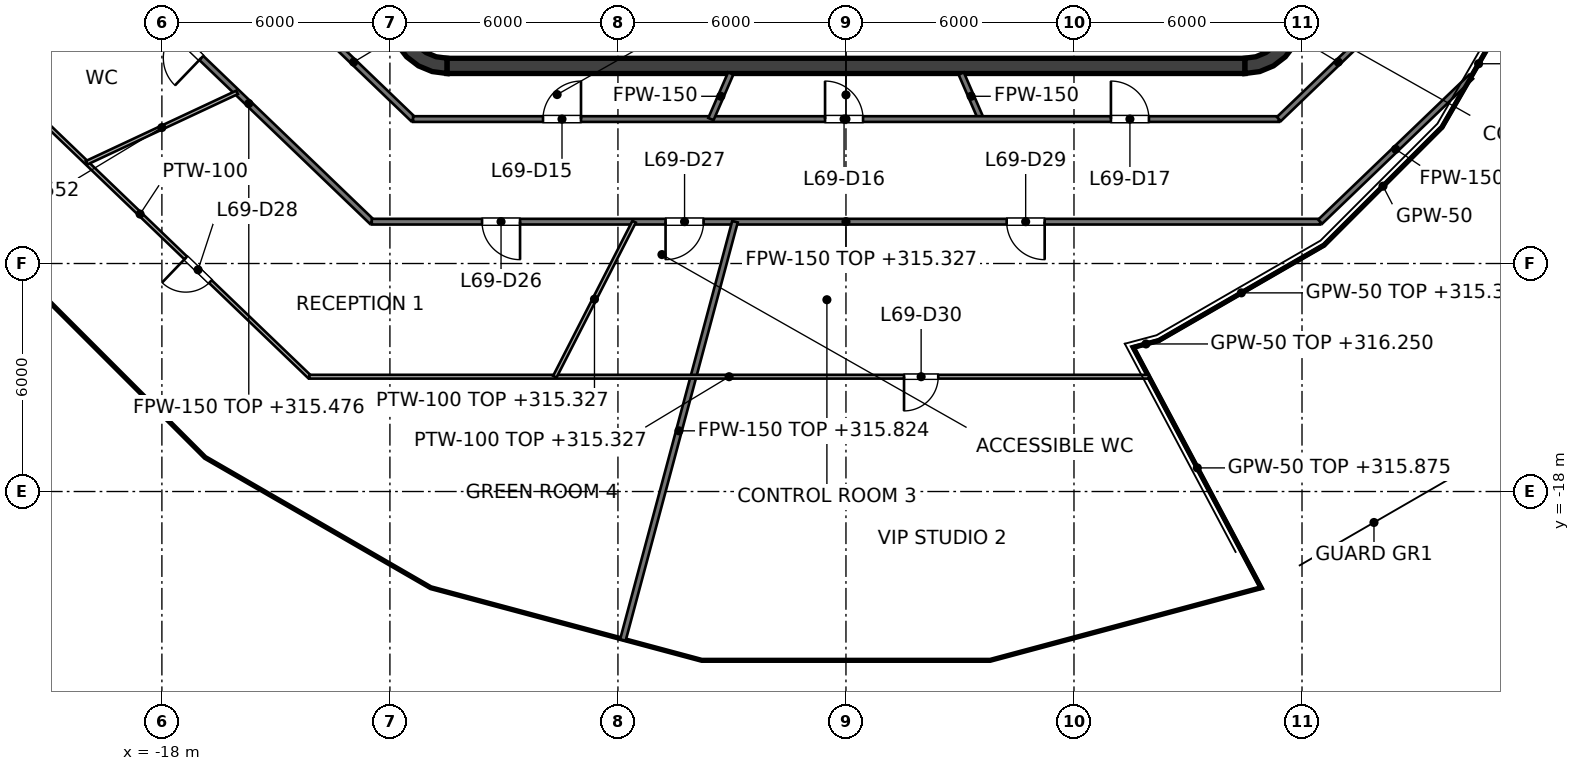
"""IFC4 building model, lengths in metres.
Left out: names, types, materials, properties, quantities, classifications, styles, units other than length and angle.
Written with IfcOpenShell. Run it as: python <this file> out.ifc"""

import sys

from ifc_helpers import new_model, si_unit, direction, frame, frame_2d, origin, place, context, subcontext, project, spatial, polyline, rectangle, outline, extrude, element, fill, save


model = new_model("IFC4")
c1 = context("Model", 3, precision=1e-05, world=origin(), true_north=direction((0.0, 1.0)))
c2 = subcontext(c1, "Body", "Model", "MODEL_VIEW")
j1 = project(units=[si_unit("LENGTHUNIT", "METRE"), si_unit("PLANEANGLEUNIT", "RADIAN")], contexts=[c1])
p1 = place(None, origin())
s1 = spatial("IfcSite", under=j1, at=p1, CompositionType="ELEMENT")
p2 = place(p1, origin())
s2 = spatial("IfcBuilding", under=s1, at=p2, CompositionType="ELEMENT")
p3 = place(p2, frame((0.0, 0.0, 312.4)))
s3 = spatial("IfcBuildingStorey", under=s2, at=p3, CompositionType="ELEMENT", Elevation=312.4)
p4 = place(p3, frame((-10.5, -6.8, 0.0), z_axis=(0.0, 0.0, 1.0), x_axis=(1.0, 0.0, 0.0)))
e1 = element("IfcWall", 1, at=p4, inside=s3, PredefinedType="SHEAR", context=c2, shape_type="SweptSolid", body=[
    extrude(rectangle(XDim=21.0, YDim=0.4, at=frame_2d((10.5, 0.0))), origin(), (0.0, 0.0, 1.0), 4.0),
])
p5 = place(p3, origin())
e2 = element("IfcWall", 2, at=p5, inside=s3, PredefinedType="SHEAR", context=c2, shape_type="SweptSolid", body=[
    extrude(outline(polyline([(-10.5, -7.0), (-10.5, -6.596), (-10.784, -6.559), (-11.048, -6.45), (-11.275, -6.275), (-11.45, -6.048), (-11.559, -5.784), (-11.596, -5.5), (-12.0, -5.5), (-11.949, -5.888), (-11.799, -6.25), (-11.561, -6.561), (-11.25, -6.799), (-10.888, -6.949), (-10.5, -7.0)])), origin(), (0.0, 0.0, 1.0), 4.0),
])
e3 = element("IfcWall", 3, at=p5, inside=s3, PredefinedType="SHEAR", context=c2, shape_type="SweptSolid", body=[
    extrude(outline(polyline([(12.0, -5.5), (11.596, -5.5), (11.559, -5.784), (11.45, -6.048), (11.275, -6.275), (11.048, -6.45), (10.784, -6.559), (10.5, -6.596), (10.5, -7.0), (10.888, -6.949), (11.25, -6.799), (11.561, -6.561), (11.799, -6.25), (11.949, -5.888), (12.0, -5.5)])), origin(), (0.0, 0.0, 1.0), 4.0),
])
p6 = place(p3, frame((1.5, -6.6, 0.0), z_axis=(0.0, 0.0, 1.0), x_axis=(0.0, 1.0, 0.0)))
e4 = element("IfcWall", 4, at=p6, inside=s3, PredefinedType="PARTITIONING", context=c2, shape_type="SweptSolid", body=[
    extrude(rectangle(XDim=2.5, YDim=0.15, at=frame_2d((1.25, 0.0))), origin(), (0.0, 0.0, 1.0), 3.85),
])
p7 = place(p6, frame((0.8, 0.0, 0.0)))
e5 = element("IfcOpeningElement", 5, at=p7, cuts=e4, PredefinedType="OPENING", context=c2, shape_type="SweptSolid", body=[
    extrude(rectangle(XDim=0.9, YDim=2.1, at=frame_2d((0.45, 1.05))), frame((0.0, 0.075, 0.0), z_axis=(0.0, -1.0, 0.0), x_axis=(1.0, 0.0, 0.0)), (0.0, 0.0, 1.0), 0.15),
])
p8 = place(p3, frame((9.0, -6.6, 0.0), z_axis=(0.0, 0.0, 1.0), x_axis=(0.0, 1.0, 0.0)))
e6 = element("IfcWall", 6, at=p8, inside=s3, PredefinedType="SOLIDWALL", context=c2, shape_type="SweptSolid", body=[
    extrude(rectangle(XDim=2.5, YDim=0.25, at=frame_2d((1.25, 0.0))), origin(), (0.0, 0.0, 1.0), 3.85),
])
p9 = place(p8, frame((0.65, 0.0, 0.0)))
e7 = element("IfcOpeningElement", 7, at=p9, cuts=e6, PredefinedType="OPENING", context=c2, shape_type="SweptSolid", body=[
    extrude(rectangle(XDim=1.2, YDim=2.1, at=frame_2d((0.6, 1.05))), frame((0.0, 0.125, 0.0), z_axis=(0.0, -1.0, 0.0), x_axis=(1.0, 0.0, 0.0)), (0.0, 0.0, 1.0), 0.25),
])
p10 = place(p3, frame((-9.0, -6.6, 0.0), z_axis=(0.0, 0.0, 1.0), x_axis=(0.0, 1.0, 0.0)))
e8 = element("IfcWall", 8, at=p10, inside=s3, PredefinedType="PARTITIONING", context=c2, shape_type="SweptSolid", body=[
    extrude(rectangle(XDim=2.5, YDim=0.25, at=frame_2d((1.25, 0.0))), origin(), (0.0, 0.0, 1.0), 3.85),
])
p11 = place(p10, frame((0.75, 0.0, 0.0)))
e9 = element("IfcOpeningElement", 9, at=p11, cuts=e8, PredefinedType="OPENING", context=c2, shape_type="SweptSolid", body=[
    extrude(rectangle(XDim=1.0, YDim=2.1, at=frame_2d((0.5, 1.05))), frame((0.0, 0.125, 0.0), z_axis=(0.0, -1.0, 0.0), x_axis=(1.0, 0.0, 0.0)), (0.0, 0.0, 1.0), 0.25),
])
p12 = place(p3, frame((3.15, -6.6, 0.0), z_axis=(0.0, 0.0, 1.0), x_axis=(0.0, 1.0, 0.0)))
e10 = element("IfcWall", 10, at=p12, inside=s3, PredefinedType="SOLIDWALL", context=c2, shape_type="SweptSolid", body=[
    extrude(rectangle(XDim=2.5, YDim=0.25, at=frame_2d((1.25, 0.0))), origin(), (0.0, 0.0, 1.0), 3.85),
])
p13 = place(p3, frame((-2.9, -6.6, 0.0), z_axis=(0.0, 0.0, 1.0), x_axis=(0.0, 1.0, 0.0)))
e11 = element("IfcWall", 11, at=p13, inside=s3, PredefinedType="PARTITIONING", context=c2, shape_type="SweptSolid", body=[
    extrude(rectangle(XDim=2.5, YDim=0.25, at=frame_2d((1.25, 0.0))), origin(), (0.0, 0.0, 1.0), 3.85),
])
p14 = place(p13, frame((0.8, 0.0, 0.0)))
e12 = element("IfcOpeningElement", 12, at=p14, cuts=e11, PredefinedType="OPENING", context=c2, shape_type="SweptSolid", body=[
    extrude(rectangle(XDim=0.9, YDim=2.1, at=frame_2d((0.45, 1.05))), frame((0.0, 0.125, 0.0), z_axis=(0.0, -1.0, 0.0), x_axis=(1.0, 0.0, 0.0)), (0.0, 0.0, 1.0), 0.25),
])
p15 = place(p3, frame((3.033, -7.0, 0.0), z_axis=(0.0, 0.0, 1.0), x_axis=(0.397906243356, -0.917426085033, 0.0)))
e13 = element("IfcWall", 13, at=p15, inside=s3, PredefinedType="PARTITIONING", context=c2, shape_type="SweptSolid", body=[
    extrude(rectangle(XDim=1.307, YDim=0.15, at=frame_2d((0.653, 0.0))), origin(), (0.0, 0.0, 1.0), 3.85),
])
p16 = place(p3, frame((-18.95, -4.683, 0.0), z_axis=(0.0, 0.0, 1.0), x_axis=(0.721312831662, -0.692609412931, 0.0)))
e14 = element("IfcWall", 14, at=p16, inside=s3, PredefinedType="PARTITIONING", context=c2, shape_type="SweptSolid", body=[
    extrude(rectangle(XDim=8.973, YDim=0.15, at=frame_2d((4.487, 0.0))), origin(), (0.0, 0.0, 1.0), 3.076),
])
p17 = place(p16, frame((1.755, 0.0, 0.0)))
e15 = element("IfcOpeningElement", 15, at=p17, cuts=e14, PredefinedType="OPENING", context=c2, shape_type="SweptSolid", body=[
    extrude(rectangle(XDim=1.0, YDim=2.1, at=frame_2d((0.5, 1.05))), frame((0.0, 0.075, 0.0), z_axis=(0.0, -1.0, 0.0), x_axis=(1.0, 0.0, 0.0)), (0.0, 0.0, 1.0), 0.15),
])
p18 = place(p3, frame((-14.514, -5.2, 0.0), z_axis=(0.0, 0.0, 1.0), x_axis=(0.721283649967, -0.692639802704, 0.0)))
e16 = element("IfcWall", 16, at=p18, inside=s3, PredefinedType="PARTITIONING", context=c2, shape_type="SweptSolid", body=[
    extrude(rectangle(XDim=4.33, YDim=0.15, at=frame_2d((2.165, 0.0))), origin(), (0.0, 0.0, 1.0), 3.152),
])
p19 = place(p3, frame((-12.478, -10.899, 0.0), z_axis=(0.0, 0.0, 1.0), x_axis=(1.0, 0.0, 0.0)))
e17 = element("IfcWall", 17, at=p19, inside=s3, PredefinedType="PARTITIONING", context=c2, shape_type="SweptSolid", body=[
    extrude(rectangle(XDim=24.956, YDim=0.15, at=frame_2d((12.478, 0.0))), origin(), (0.0, 0.0, 1.0), 2.927),
])
p20 = place(p19, frame((2.902, 0.0, 0.0)))
e18 = element("IfcOpeningElement", 18, at=p20, cuts=e17, PredefinedType="OPENING", context=c2, shape_type="SweptSolid", body=[
    extrude(rectangle(XDim=1.0, YDim=2.1, at=frame_2d((0.5, 1.05))), frame((0.0, 0.075, 0.0), z_axis=(0.0, -1.0, 0.0), x_axis=(1.0, 0.0, 0.0)), (0.0, 0.0, 1.0), 0.15),
])
p21 = place(p19, frame((7.731, 0.0, 0.0)))
e19 = element("IfcOpeningElement", 19, at=p21, cuts=e17, PredefinedType="OPENING", context=c2, shape_type="SweptSolid", body=[
    extrude(rectangle(XDim=1.0, YDim=2.1, at=frame_2d((0.5, 1.05))), frame((0.0, 0.075, 0.0), z_axis=(0.0, -1.0, 0.0), x_axis=(1.0, 0.0, 0.0)), (0.0, 0.0, 1.0), 0.15),
])
p22 = place(p19, frame((16.707, 0.0, 0.0)))
e20 = element("IfcOpeningElement", 20, at=p22, cuts=e17, PredefinedType="OPENING", context=c2, shape_type="SweptSolid", body=[
    extrude(rectangle(XDim=1.0, YDim=2.1, at=frame_2d((0.5, 1.05))), frame((0.0, 0.075, 0.0), z_axis=(0.0, -1.0, 0.0), x_axis=(1.0, 0.0, 0.0)), (0.0, 0.0, 1.0), 0.15),
])
p23 = place(p3, frame((-11.391, -8.199, 0.0), z_axis=(0.0, 0.0, 1.0), x_axis=(1.0, 0.0, 0.0)))
e21 = element("IfcWall", 21, at=p23, inside=s3, PredefinedType="PARTITIONING", context=c2, shape_type="SweptSolid", body=[
    extrude(rectangle(XDim=22.782, YDim=0.15, at=frame_2d((11.391, 0.0))), origin(), (0.0, 0.0, 1.0), 2.927),
])
p24 = place(p23, frame((3.419, 0.0, 0.0)))
e22 = element("IfcOpeningElement", 22, at=p24, cuts=e21, PredefinedType="OPENING", context=c2, shape_type="SweptSolid", body=[
    extrude(rectangle(XDim=1.0, YDim=2.1, at=frame_2d((0.5, 1.05))), frame((0.0, 0.075, 0.0), z_axis=(0.0, -1.0, 0.0), x_axis=(1.0, 0.0, 0.0)), (0.0, 0.0, 1.0), 0.15),
])
p25 = place(p23, frame((10.841, 0.0, 0.0)))
e23 = element("IfcOpeningElement", 23, at=p25, cuts=e21, PredefinedType="OPENING", context=c2, shape_type="SweptSolid", body=[
    extrude(rectangle(XDim=1.0, YDim=2.1, at=frame_2d((0.5, 1.05))), frame((0.0, 0.075, 0.0), z_axis=(0.0, -1.0, 0.0), x_axis=(1.0, 0.0, 0.0)), (0.0, 0.0, 1.0), 0.15),
])
p26 = place(p23, frame((18.363, 0.0, 0.0)))
e24 = element("IfcOpeningElement", 24, at=p26, cuts=e21, PredefinedType="OPENING", context=c2, shape_type="SweptSolid", body=[
    extrude(rectangle(XDim=1.0, YDim=2.1, at=frame_2d((0.5, 1.05))), frame((0.0, 0.075, 0.0), z_axis=(0.0, -1.0, 0.0), x_axis=(1.0, 0.0, 0.0)), (0.0, 0.0, 1.0), 0.15),
])
p27 = place(p3, frame((-24.461, -6.554, 0.0), z_axis=(0.0, 0.0, 1.0), x_axis=(0.965890459785, 0.258950998638, 0.0)))
e25 = element("IfcWall", 25, at=p27, inside=s3, PredefinedType="PARTITIONING", context=c2, shape_type="SweptSolid", body=[
    extrude(rectangle(XDim=6.038, YDim=0.15, at=frame_2d((3.019, 0.0))), origin(), (0.0, 0.0, 1.0), 3.527),
])
p28 = place(p3, frame((12.478, -10.899, 0.0), z_axis=(0.0, 0.0, 1.0), x_axis=(0.721258856926, 0.692665620127, 0.0)))
e26 = element("IfcWall", 26, at=p28, inside=s3, PredefinedType="PARTITIONING", context=c2, shape_type="SweptSolid", body=[
    extrude(rectangle(XDim=5.507, YDim=0.15, at=frame_2d((2.754, 0.0))), origin(), (0.0, 0.0, 1.0), 3.076),
])
p29 = place(p3, frame((11.391, -8.199, 0.0), z_axis=(0.0, 0.0, 1.0), x_axis=(0.721256597366, 0.692667972954, 0.0)))
e27 = element("IfcWall", 27, at=p29, inside=s3, PredefinedType="PARTITIONING", context=c2, shape_type="SweptSolid", body=[
    extrude(rectangle(XDim=4.33, YDim=0.15, at=frame_2d((2.165, 0.0))), origin(), (0.0, 0.0, 1.0), 3.152),
])
p30 = place(p3, frame((-3.553, -8.199, 0.0), z_axis=(0.0, 0.0, 1.0), x_axis=(0.397906243356, 0.917426085033, 0.0)))
e28 = element("IfcWall", 28, at=p30, inside=s3, PredefinedType="PARTITIONING", context=c2, shape_type="SweptSolid", body=[
    extrude(rectangle(XDim=1.307, YDim=0.15, at=frame_2d((0.653, 0.0))), origin(), (0.0, 0.0, 1.0), 3.85),
])
p31 = place(p3, frame((-5.87, -21.907, 0.0), z_axis=(0.0, 0.0, 1.0), x_axis=(0.258847804171, 0.965918119861, 0.0)))
e29 = element("IfcWall", 29, at=p31, inside=s3, PredefinedType="PARTITIONING", context=c2, shape_type="SweptSolid", body=[
    extrude(rectangle(XDim=11.396, YDim=0.15, at=frame_2d((5.698, 0.0))), origin(), (0.0, 0.0, 1.0), 3.424),
])
p32 = place(p3, frame((7.558, -14.207, 0.0), z_axis=(0.0, 0.0, 1.0), x_axis=(0.46979441649, -0.882775852771, 0.0)))
e30 = element("IfcWall", 30, at=p32, inside=s3, PredefinedType="PARTITIONING", context=c2, shape_type="SweptSolid", body=[
    extrude(rectangle(XDim=7.185, YDim=0.05, at=frame_2d((3.593, 0.0))), origin(), (0.0, 0.0, 1.0), 3.475),
])
p33 = place(p3, frame((7.558, -14.207, 0.0), z_axis=(0.0, 0.0, 1.0), x_axis=(0.966054348396, 0.258338916824, 0.0)))
e31 = element("IfcWall", 31, at=p33, inside=s3, PredefinedType="PARTITIONING", context=c2, shape_type="SweptSolid", body=[
    extrude(rectangle(XDim=0.697, YDim=0.05, at=frame_2d((0.348, 0.0))), origin(), (0.0, 0.0, 1.0), 3.85),
])
p34 = place(p3, frame((8.231, -14.027, 0.0), z_axis=(0.0, 0.0, 1.0), x_axis=(0.866082721662, 0.49990070938, 0.0)))
e32 = element("IfcWall", 32, at=p34, inside=s3, PredefinedType="PARTITIONING", context=c2, shape_type="SweptSolid", body=[
    extrude(rectangle(XDim=5.019, YDim=0.05, at=frame_2d((2.51, 0.0))), origin(), (0.0, 0.0, 1.0), 2.927),
])
p35 = place(p3, frame((12.578, -11.518, 0.0), z_axis=(0.0, 0.0, 1.0), x_axis=(0.707023420529, 0.707190132017, 0.0)))
e33 = element("IfcWall", 33, at=p35, inside=s3, PredefinedType="PARTITIONING", context=c2, shape_type="SweptSolid", body=[
    extrude(rectangle(XDim=4.393, YDim=0.05, at=frame_2d((2.197, 0.0))), origin(), (0.0, 0.0, 1.0), 3.076),
])
p36 = place(p3, frame((15.684, -8.411, 0.0), z_axis=(0.0, 0.0, 1.0), x_axis=(0.49995654735, 0.86605048973, 0.0)))
e34 = element("IfcWall", 34, at=p36, inside=s3, PredefinedType="PARTITIONING", context=c2, shape_type="SweptSolid", body=[
    extrude(rectangle(XDim=3.852, YDim=0.05, at=frame_2d((1.926, 0.0))), origin(), (0.0, 0.0, 1.0), 3.076),
])
p37 = place(p3, frame((-23.03, -6.421, 0.0), z_axis=(0.0, 0.0, 1.0), x_axis=(0.721337166522, -0.692584068684, 0.0)))
e35 = element("IfcWall", 35, at=p37, inside=s3, PredefinedType="PARTITIONING", context=c2, shape_type="SweptSolid", body=[
    extrude(rectangle(XDim=12.354, YDim=0.1, at=frame_2d((6.177, 0.0))), origin(), (0.0, 0.0, 1.0), 2.995),
])
p38 = place(p37, frame((7.843, 0.0, 0.0)))
e36 = element("IfcOpeningElement", 36, at=p38, cuts=e35, PredefinedType="OPENING", context=c2, shape_type="SweptSolid", body=[
    extrude(rectangle(XDim=0.9, YDim=2.1, at=frame_2d((0.45, 1.05))), frame((0.0, 0.05, 0.0), z_axis=(0.0, -1.0, 0.0), x_axis=(1.0, 0.0, 0.0)), (0.0, 0.0, 1.0), 0.1),
])
p39 = place(p3, frame((-14.12, -14.979, 0.0), z_axis=(0.0, 0.0, 1.0), x_axis=(1.0, 0.0, 0.0)))
e37 = element("IfcWall", 37, at=p39, inside=s3, PredefinedType="PARTITIONING", context=c2, shape_type="SweptSolid", body=[
    extrude(rectangle(XDim=22.089, YDim=0.1, at=frame_2d((11.044, 0.0))), origin(), (0.0, 0.0, 1.0), 2.927),
])
p40 = place(p39, frame((15.648, 0.0, 0.0)))
e38 = element("IfcOpeningElement", 38, at=p40, cuts=e37, PredefinedType="OPENING", context=c2, shape_type="SweptSolid", body=[
    extrude(rectangle(XDim=0.9, YDim=2.1, at=frame_2d((0.45, 1.05))), frame((0.0, 0.05, 0.0), z_axis=(0.0, -1.0, 0.0), x_axis=(1.0, 0.0, 0.0)), (0.0, 0.0, 1.0), 0.1),
])
p41 = place(p3, frame((-19.982, -9.349, 0.0), z_axis=(0.0, 0.0, 1.0), x_axis=(0.905780511999, 0.42374717, 0.0)))
e39 = element("IfcWall", 39, at=p41, inside=s3, PredefinedType="PARTITIONING", context=c2, shape_type="SweptSolid", body=[
    extrude(rectangle(XDim=4.373, YDim=0.1, at=frame_2d((2.187, 0.0))), origin(), (0.0, 0.0, 1.0), 3.152),
])
p42 = place(p3, frame((-7.661, -14.979, 0.0), z_axis=(0.0, 0.0, 1.0), x_axis=(0.455377612986, 0.890298393569, 0.0)))
e40 = element("IfcWall", 40, at=p42, inside=s3, PredefinedType="PARTITIONING", context=c2, shape_type="SweptSolid", body=[
    extrude(rectangle(XDim=4.583, YDim=0.1, at=frame_2d((2.292, 0.0))), origin(), (0.0, 0.0, 1.0), 2.927),
])
p43 = place(p24, origin())
e41 = element("IfcDoor", 41, at=p43, inside=s3, OperationType="SINGLE_SWING_RIGHT", PredefinedType="DOOR", context=c2, shape_type="SweptSolid", body=[
    extrude(rectangle(XDim=1.0, YDim=2.1, at=frame_2d((0.5, 1.05))), frame((0.0, 0.025, 0.0), z_axis=(0.0, -1.0, 0.0), x_axis=(1.0, 0.0, 0.0)), (0.0, 0.0, 1.0), 0.05),
])
fill(e22, e41)
p44 = place(p25, origin())
e42 = element("IfcDoor", 42, at=p44, inside=s3, OperationType="SINGLE_SWING_LEFT", PredefinedType="DOOR", context=c2, shape_type="SweptSolid", body=[
    extrude(rectangle(XDim=1.0, YDim=2.1, at=frame_2d((0.5, 1.05))), frame((0.0, 0.025, 0.0), z_axis=(0.0, -1.0, 0.0), x_axis=(1.0, 0.0, 0.0)), (0.0, 0.0, 1.0), 0.05),
])
fill(e23, e42)
p45 = place(p26, origin())
e43 = element("IfcDoor", 43, at=p45, inside=s3, OperationType="SINGLE_SWING_LEFT", PredefinedType="DOOR", context=c2, shape_type="SweptSolid", body=[
    extrude(rectangle(XDim=1.0, YDim=2.1, at=frame_2d((0.5, 1.05))), frame((0.0, 0.025, 0.0), z_axis=(0.0, -1.0, 0.0), x_axis=(1.0, 0.0, 0.0)), (0.0, 0.0, 1.0), 0.05),
])
fill(e24, e43)
p46 = place(p17, origin())
e44 = element("IfcDoor", 44, at=p46, inside=s3, OperationType="SINGLE_SWING_RIGHT", PredefinedType="DOOR", context=c2, shape_type="SweptSolid", body=[
    extrude(rectangle(XDim=1.0, YDim=2.1, at=frame_2d((0.5, 1.05))), frame((0.0, 0.025, 0.0), z_axis=(0.0, -1.0, 0.0), x_axis=(1.0, 0.0, 0.0)), (0.0, 0.0, 1.0), 0.05),
])
fill(e15, e44)
p47 = place(p20, origin())
e45 = element("IfcDoor", 45, at=p47, inside=s3, OperationType="SINGLE_SWING_RIGHT", PredefinedType="DOOR", context=c2, shape_type="SweptSolid", body=[
    extrude(rectangle(XDim=1.0, YDim=2.1, at=frame_2d((0.5, 1.05))), frame((0.0, 0.025, 0.0), z_axis=(0.0, -1.0, 0.0), x_axis=(1.0, 0.0, 0.0)), (0.0, 0.0, 1.0), 0.05),
])
fill(e18, e45)
p48 = place(p21, origin())
e46 = element("IfcDoor", 46, at=p48, inside=s3, OperationType="SINGLE_SWING_LEFT", PredefinedType="DOOR", context=c2, shape_type="SweptSolid", body=[
    extrude(rectangle(XDim=1.0, YDim=2.1, at=frame_2d((0.5, 1.05))), frame((0.0, 0.025, 0.0), z_axis=(0.0, -1.0, 0.0), x_axis=(1.0, 0.0, 0.0)), (0.0, 0.0, 1.0), 0.05),
])
fill(e19, e46)
p49 = place(p38, origin())
e47 = element("IfcDoor", 47, at=p49, inside=s3, OperationType="SINGLE_SWING_LEFT", PredefinedType="DOOR", context=c2, shape_type="SweptSolid", body=[
    extrude(rectangle(XDim=0.9, YDim=2.1, at=frame_2d((0.45, 1.05))), frame((0.0, 0.025, 0.0), z_axis=(0.0, -1.0, 0.0), x_axis=(1.0, 0.0, 0.0)), (0.0, 0.0, 1.0), 0.05),
])
fill(e36, e47)
p50 = place(p22, origin())
e48 = element("IfcDoor", 48, at=p50, inside=s3, OperationType="SINGLE_SWING_RIGHT", PredefinedType="DOOR", context=c2, shape_type="SweptSolid", body=[
    extrude(rectangle(XDim=1.0, YDim=2.1, at=frame_2d((0.5, 1.05))), frame((0.0, 0.025, 0.0), z_axis=(0.0, -1.0, 0.0), x_axis=(1.0, 0.0, 0.0)), (0.0, 0.0, 1.0), 0.05),
])
fill(e20, e48)
p51 = place(p40, origin())
e49 = element("IfcDoor", 49, at=p51, inside=s3, OperationType="SINGLE_SWING_LEFT", PredefinedType="DOOR", context=c2, shape_type="SweptSolid", body=[
    extrude(rectangle(XDim=0.9, YDim=2.1, at=frame_2d((0.45, 1.05))), frame((0.0, 0.025, 0.0), z_axis=(0.0, -1.0, 0.0), x_axis=(1.0, 0.0, 0.0)), (0.0, 0.0, 1.0), 0.05),
])
fill(e38, e49)
save(model, sys.argv[1])
